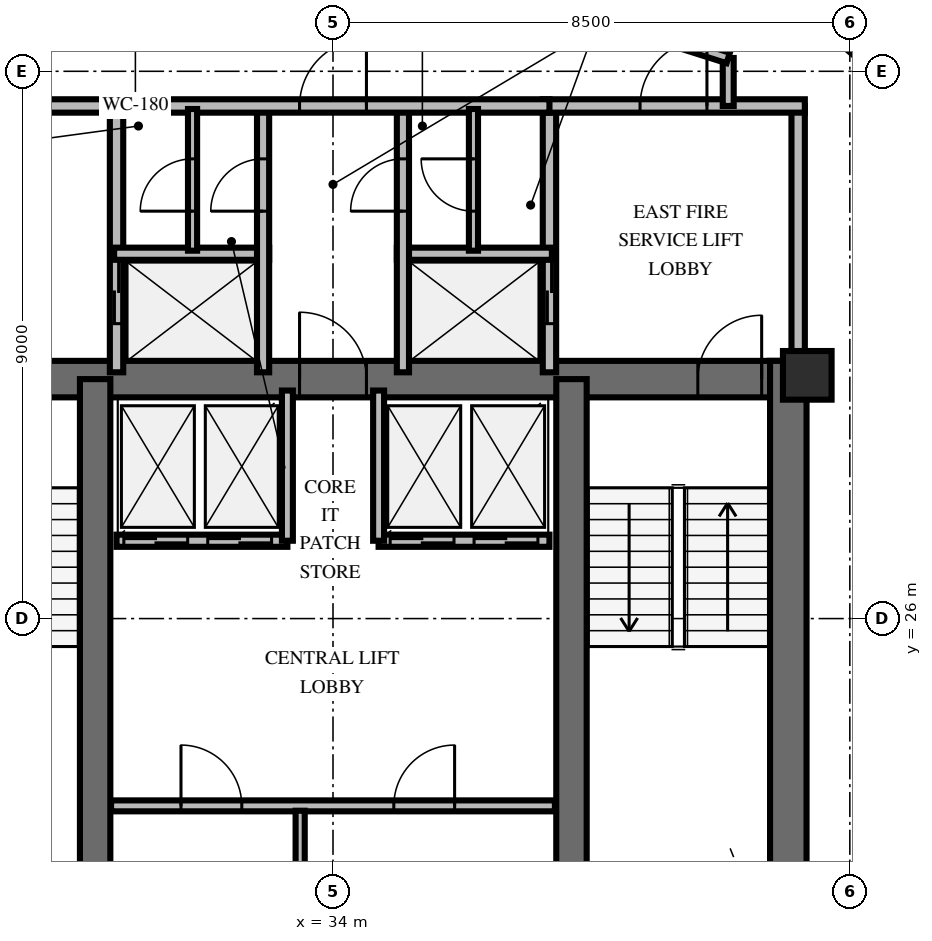
"""IFC4 building model, lengths in metres.
Left out: names, types, materials, properties, quantities, classifications, styles, units other than length and angle.
Written with IfcOpenShell. Run it as: python <this file> out.ifc"""

import sys

from ifc_helpers import new_model, si_unit, direction, frame, frame_2d, origin, origin_2d, place, context, subcontext, project, spatial, rectangle, extrude, element, fill, save


model = new_model("IFC4")
c1 = context("Model", 3, precision=1e-05, world=origin(), true_north=direction((0.0, 1.0)))
c2 = subcontext(c1, "Body", "Model", "MODEL_VIEW")
j1 = project(units=[si_unit("LENGTHUNIT", "METRE"), si_unit("PLANEANGLEUNIT", "RADIAN")], contexts=[c1])
p1 = place(None, origin())
s1 = spatial("IfcSite", under=j1, at=p1, CompositionType="ELEMENT")
p2 = place(p1, origin())
s2 = spatial("IfcBuilding", under=s1, at=p2, CompositionType="ELEMENT")
p3 = place(p2, frame((0.0, 0.0, 266.4)))
s3 = spatial("IfcBuildingStorey", under=s2, at=p3, CompositionType="ELEMENT", Elevation=266.4)
p4 = place(p3, frame((26.222, 29.938, 0.0), z_axis=(0.0, 0.0, 1.0), x_axis=(1.0, 0.0, 0.0)))
e1 = element("IfcWall", 1, at=p4, inside=s3, PredefinedType="SHEAR", context=c2, shape_type="SweptSolid", body=[
    extrude(rectangle(XDim=15.566, YDim=0.6, at=frame_2d((7.783, 0.0))), origin(), (0.0, 0.0, 1.0), 3.6),
])
p5 = place(p4, frame((0.728, 0.0, 0.0)))
e2 = element("IfcOpeningElement", 2, at=p5, cuts=e1, PredefinedType="OPENING", context=c2, shape_type="SweptSolid", body=[
    extrude(rectangle(XDim=1.05, YDim=2.15, at=frame_2d((0.525, 1.075))), frame((0.0, 0.31, 0.0), z_axis=(0.0, -1.0, 0.0), x_axis=(1.0, 0.0, 0.0)), (0.0, 0.0, 1.0), 0.62),
])
p6 = place(p4, frame((13.778, 0.0, 0.0)))
e3 = element("IfcOpeningElement", 3, at=p6, cuts=e1, PredefinedType="OPENING", context=c2, shape_type="SweptSolid", body=[
    extrude(rectangle(XDim=1.05, YDim=2.15, at=frame_2d((0.525, 1.075))), frame((0.0, 0.31, 0.0), z_axis=(0.0, -1.0, 0.0), x_axis=(1.0, 0.0, 0.0)), (0.0, 0.0, 1.0), 0.62),
])
p7 = place(p4, frame((7.228, 0.0, 0.0)))
e4 = element("IfcOpeningElement", 4, at=p7, cuts=e1, PredefinedType="OPENING", context=c2, shape_type="SweptSolid", body=[
    extrude(rectangle(XDim=1.1, YDim=2.15, at=frame_2d((0.55, 1.075))), frame((0.0, 0.31, 0.0), z_axis=(0.0, -1.0, 0.0), x_axis=(1.0, 0.0, 0.0)), (0.0, 0.0, 1.0), 0.62),
])
p8 = place(p3, frame((41.488, 19.962, 0.0), z_axis=(0.0, 0.0, 1.0), x_axis=(0.0, 1.0, 0.0)))
e5 = element("IfcWall", 5, at=p8, inside=s3, PredefinedType="SHEAR", context=c2, shape_type="SweptSolid", body=[
    extrude(rectangle(XDim=10.276, YDim=0.6, at=frame_2d((5.138, 0.0))), origin(), (0.0, 0.0, 1.0), 3.6),
])
for number, where, z_axis, x_axis in (
    (6, (30.088, 20.262, 0.0), (0.0, 0.0, 1.0), (0.0, 1.0, 0.0)),
    (7, (37.922, 20.262, 0.0), (0.0, 0.0, 1.0), (0.0, 1.0, 0.0)),
):
    element("IfcWall", number, at=place(p3, frame(where, z_axis=z_axis, x_axis=x_axis)), inside=s3, PredefinedType="SHEAR", context=c2, shape_type="SweptSolid", body=[
        extrude(rectangle(XDim=9.676, YDim=0.5, at=frame_2d((4.838, 0.0))), origin(), (0.0, 0.0, 1.0), 3.6),
    ])
p9 = place(p3, frame((41.8, 30.0, 0.0), z_axis=(0.0, 0.0, 1.0), x_axis=(1.0, 0.0, 0.0)))
e8 = element("IfcColumn", 8, at=p9, inside=s3, PredefinedType="PILASTER", context=c2, shape_type="SweptSolid", body=[
    extrude(rectangle(XDim=0.8, YDim=0.8, at=origin_2d()), origin(), (0.0, 0.0, 1.0), 3.6),
])
p10 = place(p3, frame((30.44, 30.05, 0.0), z_axis=(0.0, 0.0, 1.0), x_axis=(0.0, 1.0, 0.0)))
e9 = element("IfcWall", 9, at=p10, inside=s3, PredefinedType="SOLIDWALL", context=c2, shape_type="SweptSolid", body=[
    extrude(rectangle(XDim=4.38, YDim=0.22, at=frame_2d((2.19, 0.0))), origin(), (0.0, 0.0, 1.0), 2.46),
])
p11 = place(p10, frame((0.8, 0.0, 0.0)))
e10 = element("IfcOpeningElement", 10, at=p11, cuts=e9, PredefinedType="OPENING", context=c2, shape_type="SweptSolid", body=[
    extrude(rectangle(XDim=1.05, YDim=2.1, at=frame_2d((0.525, 1.05))), frame((0.0, 0.12, 0.0), z_axis=(0.0, -1.0, 0.0), x_axis=(1.0, 0.0, 0.0)), (0.0, 0.0, 1.0), 0.24),
])
p12 = place(p3, frame((26.24, 34.43, 0.0), z_axis=(0.0, 0.0, 1.0), x_axis=(1.0, 0.0, 0.0)))
e11 = element("IfcWall", 11, at=p12, inside=s3, PredefinedType="SOLIDWALL", context=c2, shape_type="SweptSolid", body=[
    extrude(rectangle(XDim=4.31, YDim=0.22, at=frame_2d((2.155, 0.0))), origin(), (0.0, 0.0, 1.0), 2.46),
])
p13 = place(p12, frame((1.6, 0.0, 0.0)))
e12 = element("IfcOpeningElement", 12, at=p13, cuts=e11, PredefinedType="OPENING", context=c2, shape_type="SweptSolid", body=[
    extrude(rectangle(XDim=1.1, YDim=2.15, at=frame_2d((0.55, 1.075))), frame((0.0, 0.12, 0.0), z_axis=(0.0, -1.0, 0.0), x_axis=(1.0, 0.0, 0.0)), (0.0, 0.0, 1.0), 0.24),
])
p14 = place(p3, frame((30.4, 32.0, 0.0), z_axis=(0.0, 0.0, 1.0), x_axis=(1.0, 0.0, 0.0)))
e13 = element("IfcWall", 13, at=p14, inside=s3, PredefinedType="SOLIDWALL", context=c2, shape_type="SweptSolid", body=[
    extrude(rectangle(XDim=2.55, YDim=0.2, at=frame_2d((1.275, 0.0))), origin(), (0.0, 0.0, 1.0), 2.46),
])
p15 = place(p3, frame((32.85, 30.05, 0.0), z_axis=(0.0, 0.0, 1.0), x_axis=(0.0, 1.0, 0.0)))
e14 = element("IfcWall", 14, at=p15, inside=s3, PredefinedType="SOLIDWALL", context=c2, shape_type="SweptSolid", body=[
    extrude(rectangle(XDim=4.38, YDim=0.2, at=frame_2d((2.19, 0.0))), origin(), (0.0, 0.0, 1.0), 2.46),
])
p16 = place(p15, frame((2.65, 0.0, 0.0)))
e15 = element("IfcOpeningElement", 15, at=p16, cuts=e14, PredefinedType="OPENING", context=c2, shape_type="SweptSolid", body=[
    extrude(rectangle(XDim=0.86, YDim=2.05, at=frame_2d((0.43, 1.025))), frame((0.0, 0.11, 0.0), z_axis=(0.0, -1.0, 0.0), x_axis=(1.0, 0.0, 0.0)), (0.0, 0.0, 1.0), 0.22),
])
p17 = place(p3, frame((37.56, 30.05, 0.0), z_axis=(0.0, 0.0, 1.0), x_axis=(0.0, 1.0, 0.0)))
e16 = element("IfcWall", 16, at=p17, inside=s3, PredefinedType="SOLIDWALL", context=c2, shape_type="SweptSolid", body=[
    extrude(rectangle(XDim=4.38, YDim=0.22, at=frame_2d((2.19, 0.0))), origin(), (0.0, 0.0, 1.0), 2.46),
])
p18 = place(p17, frame((0.8, 0.0, 0.0)))
e17 = element("IfcOpeningElement", 17, at=p18, cuts=e16, PredefinedType="OPENING", context=c2, shape_type="SweptSolid", body=[
    extrude(rectangle(XDim=1.05, YDim=2.1, at=frame_2d((0.525, 1.05))), frame((0.0, 0.12, 0.0), z_axis=(0.0, -1.0, 0.0), x_axis=(1.0, 0.0, 0.0)), (0.0, 0.0, 1.0), 0.24),
])
p19 = place(p3, frame((41.65, 30.05, 0.0), z_axis=(0.0, 0.0, 1.0), x_axis=(0.0, 1.0, 0.0)))
e18 = element("IfcWall", 18, at=p19, inside=s3, PredefinedType="SOLIDWALL", context=c2, shape_type="SweptSolid", body=[
    extrude(rectangle(XDim=4.38, YDim=0.22, at=frame_2d((2.19, 0.0))), origin(), (0.0, 0.0, 1.0), 2.46),
])
p20 = place(p3, frame((37.45, 34.43, 0.0), z_axis=(0.0, 0.0, 1.0), x_axis=(1.0, 0.0, 0.0)))
e19 = element("IfcWall", 19, at=p20, inside=s3, PredefinedType="SOLIDWALL", context=c2, shape_type="SweptSolid", body=[
    extrude(rectangle(XDim=4.31, YDim=0.22, at=frame_2d((2.155, 0.0))), origin(), (0.0, 0.0, 1.0), 2.46),
])
p21 = place(p20, frame((1.6, 0.0, 0.0)))
e20 = element("IfcOpeningElement", 20, at=p21, cuts=e19, PredefinedType="OPENING", context=c2, shape_type="SweptSolid", body=[
    extrude(rectangle(XDim=1.1, YDim=2.15, at=frame_2d((0.55, 1.075))), frame((0.0, 0.12, 0.0), z_axis=(0.0, -1.0, 0.0), x_axis=(1.0, 0.0, 0.0)), (0.0, 0.0, 1.0), 0.24),
])
p22 = place(p3, frame((35.05, 32.0, 0.0), z_axis=(0.0, 0.0, 1.0), x_axis=(1.0, 0.0, 0.0)))
e21 = element("IfcWall", 21, at=p22, inside=s3, PredefinedType="SOLIDWALL", context=c2, shape_type="SweptSolid", body=[
    extrude(rectangle(XDim=2.55, YDim=0.2, at=frame_2d((1.275, 0.0))), origin(), (0.0, 0.0, 1.0), 2.46),
])
p23 = place(p3, frame((35.15, 30.05, 0.0), z_axis=(0.0, 0.0, 1.0), x_axis=(0.0, 1.0, 0.0)))
e22 = element("IfcWall", 22, at=p23, inside=s3, PredefinedType="SOLIDWALL", context=c2, shape_type="SweptSolid", body=[
    extrude(rectangle(XDim=4.38, YDim=0.2, at=frame_2d((2.19, 0.0))), origin(), (0.0, 0.0, 1.0), 2.46),
])
p24 = place(p23, frame((2.65, 0.0, 0.0)))
e23 = element("IfcOpeningElement", 23, at=p24, cuts=e22, PredefinedType="OPENING", context=c2, shape_type="SweptSolid", body=[
    extrude(rectangle(XDim=0.86, YDim=2.05, at=frame_2d((0.43, 1.025))), frame((0.0, 0.11, 0.0), z_axis=(0.0, -1.0, 0.0), x_axis=(1.0, 0.0, 0.0)), (0.0, 0.0, 1.0), 0.22),
])
p25 = place(p3, frame((30.44, 34.43, 0.0), z_axis=(0.0, 0.0, 1.0), x_axis=(1.0, 0.0, 0.0)))
e24 = element("IfcWall", 24, at=p25, inside=s3, PredefinedType="SOLIDWALL", context=c2, shape_type="SweptSolid", body=[
    extrude(rectangle(XDim=7.12, YDim=0.22, at=frame_2d((3.56, 0.0))), origin(), (0.0, 0.0, 1.0), 2.46),
])
p26 = place(p25, frame((3.01, 0.0, 0.0)))
e25 = element("IfcOpeningElement", 25, at=p26, cuts=e24, PredefinedType="OPENING", context=c2, shape_type="SweptSolid", body=[
    extrude(rectangle(XDim=1.1, YDim=2.15, at=frame_2d((0.55, 1.075))), frame((0.0, 0.12, 0.0), z_axis=(0.0, -1.0, 0.0), x_axis=(1.0, 0.0, 0.0)), (0.0, 0.0, 1.0), 0.24),
])
p27 = place(p3, frame((31.69, 32.05, 0.0), z_axis=(0.0, 0.0, 1.0), x_axis=(0.0, 1.0, 0.0)))
e26 = element("IfcWall", 26, at=p27, inside=s3, PredefinedType="PARTITIONING", context=c2, shape_type="SweptSolid", body=[
    extrude(rectangle(XDim=2.33, YDim=0.15, at=frame_2d((1.165, 0.0))), origin(), (0.0, 0.0, 1.0), 2.46),
])
p28 = place(p27, frame((0.65, 0.0, 0.0)))
e27 = element("IfcOpeningElement", 27, at=p28, cuts=e26, PredefinedType="OPENING", context=c2, shape_type="SweptSolid", body=[
    extrude(rectangle(XDim=0.86, YDim=2.05, at=frame_2d((0.43, 1.025))), frame((0.0, 0.085, 0.0), z_axis=(0.0, -1.0, 0.0), x_axis=(1.0, 0.0, 0.0)), (0.0, 0.0, 1.0), 0.17),
])
p29 = place(p3, frame((36.31, 32.05, 0.0), z_axis=(0.0, 0.0, 1.0), x_axis=(0.0, 1.0, 0.0)))
e28 = element("IfcWall", 28, at=p29, inside=s3, PredefinedType="PARTITIONING", context=c2, shape_type="SweptSolid", body=[
    extrude(rectangle(XDim=2.33, YDim=0.15, at=frame_2d((1.165, 0.0))), origin(), (0.0, 0.0, 1.0), 2.46),
])
p30 = place(p29, frame((0.65, 0.0, 0.0)))
e29 = element("IfcOpeningElement", 29, at=p30, cuts=e28, PredefinedType="OPENING", context=c2, shape_type="SweptSolid", body=[
    extrude(rectangle(XDim=0.86, YDim=2.05, at=frame_2d((0.43, 1.025))), frame((0.0, 0.085, 0.0), z_axis=(0.0, -1.0, 0.0), x_axis=(1.0, 0.0, 0.0)), (0.0, 0.0, 1.0), 0.17),
])
p31 = place(p3, frame((30.35, 22.92, 0.0), z_axis=(0.0, 0.0, 1.0), x_axis=(1.0, 0.0, 0.0)))
e30 = element("IfcWall", 30, at=p31, inside=s3, PredefinedType="PARTITIONING", context=c2, shape_type="SweptSolid", body=[
    extrude(rectangle(XDim=7.3, YDim=0.18, at=frame_2d((3.65, 0.0))), origin(), (0.0, 0.0, 1.0), 2.46),
])
p32 = place(p31, frame((1.15, 0.0, 0.0)))
e31 = element("IfcOpeningElement", 31, at=p32, cuts=e30, PredefinedType="OPENING", context=c2, shape_type="SweptSolid", body=[
    extrude(rectangle(XDim=1.0, YDim=2.15, at=frame_2d((0.5, 1.075))), frame((0.0, 0.1, 0.0), z_axis=(0.0, -1.0, 0.0), x_axis=(1.0, 0.0, 0.0)), (0.0, 0.0, 1.0), 0.2),
])
p33 = place(p31, frame((4.65, 0.0, 0.0)))
e32 = element("IfcOpeningElement", 32, at=p33, cuts=e30, PredefinedType="OPENING", context=c2, shape_type="SweptSolid", body=[
    extrude(rectangle(XDim=1.0, YDim=2.15, at=frame_2d((0.5, 1.075))), frame((0.0, 0.1, 0.0), z_axis=(0.0, -1.0, 0.0), x_axis=(1.0, 0.0, 0.0)), (0.0, 0.0, 1.0), 0.2),
])
p34 = place(p3, frame((33.46, 20.5, 0.0), z_axis=(0.0, 0.0, 1.0), x_axis=(0.0, 1.0, 0.0)))
e33 = element("IfcWall", 33, at=p34, inside=s3, PredefinedType="PARTITIONING", context=c2, shape_type="SweptSolid", body=[
    extrude(rectangle(XDim=2.34, YDim=0.15, at=frame_2d((1.17, 0.0))), origin(), (0.0, 0.0, 1.0), 2.46),
])
p35 = place(p3, frame((30.44, 27.28, 0.0), z_axis=(0.0, 0.0, 1.0), x_axis=(1.0, 0.0, 0.0)))
e34 = element("IfcWall", 34, at=p35, inside=s3, PredefinedType="SOLIDWALL", context=c2, shape_type="SweptSolid", body=[
    extrude(rectangle(XDim=2.81, YDim=0.2, at=frame_2d((1.405, 0.0))), origin(), (0.0, 0.0, 1.0), 2.46),
])
p36 = place(p35, frame((0.12, 0.0, 0.0)))
e35 = element("IfcOpeningElement", 35, at=p36, cuts=e34, PredefinedType="OPENING", context=c2, shape_type="SweptSolid", body=[
    extrude(rectangle(XDim=1.05, YDim=2.1, at=frame_2d((0.525, 1.05))), frame((0.0, 0.11, 0.0), z_axis=(0.0, -1.0, 0.0), x_axis=(1.0, 0.0, 0.0)), (0.0, 0.0, 1.0), 0.22),
])
p37 = place(p35, frame((1.5, 0.0, 0.0)))
e36 = element("IfcOpeningElement", 36, at=p37, cuts=e34, PredefinedType="OPENING", context=c2, shape_type="SweptSolid", body=[
    extrude(rectangle(XDim=1.05, YDim=2.1, at=frame_2d((0.525, 1.05))), frame((0.0, 0.11, 0.0), z_axis=(0.0, -1.0, 0.0), x_axis=(1.0, 0.0, 0.0)), (0.0, 0.0, 1.0), 0.22),
])
p38 = place(p3, frame((33.25, 27.28, 0.0), z_axis=(0.0, 0.0, 1.0), x_axis=(0.0, 1.0, 0.0)))
e37 = element("IfcWall", 37, at=p38, inside=s3, PredefinedType="SOLIDWALL", context=c2, shape_type="SweptSolid", body=[
    extrude(rectangle(XDim=2.47, YDim=0.18, at=frame_2d((1.235, 0.0))), origin(), (0.0, 0.0, 1.0), 2.46),
])
p39 = place(p3, frame((34.75, 27.28, 0.0), z_axis=(0.0, 0.0, 1.0), x_axis=(1.0, 0.0, 0.0)))
e38 = element("IfcWall", 38, at=p39, inside=s3, PredefinedType="SOLIDWALL", context=c2, shape_type="SweptSolid", body=[
    extrude(rectangle(XDim=2.81, YDim=0.2, at=frame_2d((1.405, 0.0))), origin(), (0.0, 0.0, 1.0), 2.46),
])
p40 = place(p39, frame((0.19, 0.0, 0.0)))
e39 = element("IfcOpeningElement", 39, at=p40, cuts=e38, PredefinedType="OPENING", context=c2, shape_type="SweptSolid", body=[
    extrude(rectangle(XDim=1.05, YDim=2.1, at=frame_2d((0.525, 1.05))), frame((0.0, 0.11, 0.0), z_axis=(0.0, -1.0, 0.0), x_axis=(1.0, 0.0, 0.0)), (0.0, 0.0, 1.0), 0.22),
])
p41 = place(p39, frame((1.57, 0.0, 0.0)))
e40 = element("IfcOpeningElement", 40, at=p41, cuts=e38, PredefinedType="OPENING", context=c2, shape_type="SweptSolid", body=[
    extrude(rectangle(XDim=1.05, YDim=2.1, at=frame_2d((0.525, 1.05))), frame((0.0, 0.11, 0.0), z_axis=(0.0, -1.0, 0.0), x_axis=(1.0, 0.0, 0.0)), (0.0, 0.0, 1.0), 0.22),
])
p42 = place(p3, frame((34.75, 27.28, 0.0), z_axis=(0.0, 0.0, 1.0), x_axis=(0.0, 1.0, 0.0)))
e41 = element("IfcWall", 41, at=p42, inside=s3, PredefinedType="SOLIDWALL", context=c2, shape_type="SweptSolid", body=[
    extrude(rectangle(XDim=2.47, YDim=0.18, at=frame_2d((1.235, 0.0))), origin(), (0.0, 0.0, 1.0), 2.46),
])
p43 = place(p3, frame((40.5, 35.219, 0.0), z_axis=(0.0, 0.0, 1.0), x_axis=(0.0, -1.0, 0.0)))
e42 = element("IfcWall", 42, at=p43, inside=s3, PredefinedType="PARTITIONING", context=c2, shape_type="SweptSolid", body=[
    extrude(rectangle(XDim=0.789, YDim=0.18, at=frame_2d((0.395, 0.0))), origin(), (0.0, 0.0, 1.0), 2.46),
])
p44 = place(p3, frame((27.5, 35.219, 0.0), z_axis=(0.0, 0.0, 1.0), x_axis=(0.953228121756, 0.302251795518, 0.0)))
e43 = element("IfcWall", 43, at=p44, inside=s3, PredefinedType="PARTITIONING", context=c2, shape_type="SweptSolid", body=[
    extrude(rectangle(XDim=6.819, YDim=0.18, at=frame_2d((3.409, 0.0))), origin(), (0.0, 0.0, 1.0), 2.46),
])
p45 = place(p44, frame((2.86, 0.0, 0.0)))
e44 = element("IfcOpeningElement", 44, at=p45, cuts=e43, PredefinedType="OPENING", context=c2, shape_type="SweptSolid", body=[
    extrude(rectangle(XDim=1.1, YDim=2.15, at=frame_2d((0.55, 1.075))), frame((0.0, 0.1, 0.0), z_axis=(0.0, -1.0, 0.0), x_axis=(1.0, 0.0, 0.0)), (0.0, 0.0, 1.0), 0.2),
])
p46 = place(p3, frame((34.0, 37.28, 0.0), z_axis=(0.0, 0.0, 1.0), x_axis=(0.953228121756, -0.302251795518, 0.0)))
e45 = element("IfcWall", 45, at=p46, inside=s3, PredefinedType="PARTITIONING", context=c2, shape_type="SweptSolid", body=[
    extrude(rectangle(XDim=6.819, YDim=0.18, at=frame_2d((3.409, 0.0))), origin(), (0.0, 0.0, 1.0), 2.46),
])
p47 = place(p46, frame((2.86, 0.0, 0.0)))
e46 = element("IfcOpeningElement", 46, at=p47, cuts=e45, PredefinedType="OPENING", context=c2, shape_type="SweptSolid", body=[
    extrude(rectangle(XDim=1.1, YDim=2.15, at=frame_2d((0.55, 1.075))), frame((0.0, 0.1, 0.0), z_axis=(0.0, -1.0, 0.0), x_axis=(1.0, 0.0, 0.0)), (0.0, 0.0, 1.0), 0.2),
])
p48 = place(p3, frame((43.859, 34.273, 0.0), z_axis=(0.0, 0.0, 1.0), x_axis=(-0.760411517563, 0.649441547761, 0.0)))
e47 = element("IfcWall", 47, at=p48, inside=s3, PredefinedType="PARTITIONING", context=c2, shape_type="SweptSolid", body=[
    extrude(rectangle(XDim=4.248, YDim=0.18, at=frame_2d((2.124, 0.0))), origin(), (0.0, 0.0, 1.0), 2.46),
])
p49 = place(p6, origin())
e48 = element("IfcDoor", 48, at=p49, inside=s3, OperationType="SINGLE_SWING_RIGHT", PredefinedType="DOOR", context=c2, shape_type="SweptSolid", body=[
    extrude(rectangle(XDim=1.05, YDim=2.15, at=frame_2d((0.525, 1.075))), frame((0.0, 0.025, 0.0), z_axis=(0.0, -1.0, 0.0), x_axis=(1.0, 0.0, 0.0)), (0.0, 0.0, 1.0), 0.05),
])
fill(e3, e48)
p50 = place(p7, origin())
e49 = element("IfcDoor", 49, at=p50, inside=s3, OperationType="SINGLE_SWING_LEFT", PredefinedType="DOOR", context=c2, shape_type="SweptSolid", body=[
    extrude(rectangle(XDim=1.1, YDim=2.15, at=frame_2d((0.55, 1.075))), frame((0.0, 0.025, 0.0), z_axis=(0.0, -1.0, 0.0), x_axis=(1.0, 0.0, 0.0)), (0.0, 0.0, 1.0), 0.05),
])
fill(e4, e49)
p51 = place(p11, origin())
e50 = element("IfcDoor", 50, at=p51, inside=s3, OperationType="DOUBLE_DOOR_SLIDING", PredefinedType="USERDEFINED", context=c2, shape_type="SweptSolid", body=[
    extrude(rectangle(XDim=1.05, YDim=2.1, at=frame_2d((0.525, 1.05))), frame((0.0, 0.025, 0.0), z_axis=(0.0, -1.0, 0.0), x_axis=(1.0, 0.0, 0.0)), (0.0, 0.0, 1.0), 0.05),
])
fill(e10, e50)
p52 = place(p16, origin())
e51 = element("IfcDoor", 51, at=p52, inside=s3, OperationType="SINGLE_SWING_LEFT", PredefinedType="TRAPDOOR", context=c2, shape_type="SweptSolid", body=[
    extrude(rectangle(XDim=0.86, YDim=2.05, at=frame_2d((0.43, 1.025))), frame((0.0, 0.025, 0.0), z_axis=(0.0, -1.0, 0.0), x_axis=(1.0, 0.0, 0.0)), (0.0, 0.0, 1.0), 0.05),
])
fill(e15, e51)
p53 = place(p21, origin())
e52 = element("IfcDoor", 52, at=p53, inside=s3, OperationType="SINGLE_SWING_RIGHT", PredefinedType="DOOR", context=c2, shape_type="SweptSolid", body=[
    extrude(rectangle(XDim=1.1, YDim=2.15, at=frame_2d((0.55, 1.075))), frame((0.0, 0.025, 0.0), z_axis=(0.0, -1.0, 0.0), x_axis=(1.0, 0.0, 0.0)), (0.0, 0.0, 1.0), 0.05),
])
fill(e20, e52)
p54 = place(p18, origin())
e53 = element("IfcDoor", 53, at=p54, inside=s3, OperationType="DOUBLE_DOOR_SLIDING", PredefinedType="USERDEFINED", context=c2, shape_type="SweptSolid", body=[
    extrude(rectangle(XDim=1.05, YDim=2.1, at=frame_2d((0.525, 1.05))), frame((0.0, 0.025, 0.0), z_axis=(0.0, -1.0, 0.0), x_axis=(1.0, 0.0, 0.0)), (0.0, 0.0, 1.0), 0.05),
])
fill(e17, e53)
p55 = place(p24, origin())
e54 = element("IfcDoor", 54, at=p55, inside=s3, OperationType="SINGLE_SWING_LEFT", PredefinedType="TRAPDOOR", context=c2, shape_type="SweptSolid", body=[
    extrude(rectangle(XDim=0.86, YDim=2.05, at=frame_2d((0.43, 1.025))), frame((0.0, 0.025, 0.0), z_axis=(0.0, -1.0, 0.0), x_axis=(1.0, 0.0, 0.0)), (0.0, 0.0, 1.0), 0.05),
])
fill(e23, e54)
p56 = place(p26, origin())
e55 = element("IfcDoor", 55, at=p56, inside=s3, OperationType="SINGLE_SWING_RIGHT", PredefinedType="DOOR", context=c2, shape_type="SweptSolid", body=[
    extrude(rectangle(XDim=1.1, YDim=2.15, at=frame_2d((0.55, 1.075))), frame((0.0, 0.025, 0.0), z_axis=(0.0, -1.0, 0.0), x_axis=(1.0, 0.0, 0.0)), (0.0, 0.0, 1.0), 0.05),
])
fill(e25, e55)
p57 = place(p28, origin())
e56 = element("IfcDoor", 56, at=p57, inside=s3, OperationType="SINGLE_SWING_LEFT", PredefinedType="TRAPDOOR", context=c2, shape_type="SweptSolid", body=[
    extrude(rectangle(XDim=0.86, YDim=2.05, at=frame_2d((0.43, 1.025))), frame((0.0, 0.025, 0.0), z_axis=(0.0, -1.0, 0.0), x_axis=(1.0, 0.0, 0.0)), (0.0, 0.0, 1.0), 0.05),
])
fill(e27, e56)
p58 = place(p30, origin())
e57 = element("IfcDoor", 57, at=p58, inside=s3, OperationType="SINGLE_SWING_RIGHT", PredefinedType="TRAPDOOR", context=c2, shape_type="SweptSolid", body=[
    extrude(rectangle(XDim=0.86, YDim=2.05, at=frame_2d((0.43, 1.025))), frame((0.0, 0.025, 0.0), z_axis=(0.0, -1.0, 0.0), x_axis=(1.0, 0.0, 0.0)), (0.0, 0.0, 1.0), 0.05),
])
fill(e29, e57)
p59 = place(p32, origin())
e58 = element("IfcDoor", 58, at=p59, inside=s3, OperationType="SINGLE_SWING_LEFT", PredefinedType="DOOR", context=c2, shape_type="SweptSolid", body=[
    extrude(rectangle(XDim=1.0, YDim=2.15, at=frame_2d((0.5, 1.075))), frame((0.0, 0.025, 0.0), z_axis=(0.0, -1.0, 0.0), x_axis=(1.0, 0.0, 0.0)), (0.0, 0.0, 1.0), 0.05),
])
fill(e31, e58)
p60 = place(p33, origin())
e59 = element("IfcDoor", 59, at=p60, inside=s3, OperationType="SINGLE_SWING_RIGHT", PredefinedType="DOOR", context=c2, shape_type="SweptSolid", body=[
    extrude(rectangle(XDim=1.0, YDim=2.15, at=frame_2d((0.5, 1.075))), frame((0.0, 0.025, 0.0), z_axis=(0.0, -1.0, 0.0), x_axis=(1.0, 0.0, 0.0)), (0.0, 0.0, 1.0), 0.05),
])
fill(e32, e59)
p61 = place(p36, origin())
e60 = element("IfcDoor", 60, at=p61, inside=s3, OperationType="DOUBLE_DOOR_SLIDING", PredefinedType="USERDEFINED", context=c2, shape_type="SweptSolid", body=[
    extrude(rectangle(XDim=1.05, YDim=2.1, at=frame_2d((0.525, 1.05))), frame((0.0, 0.025, 0.0), z_axis=(0.0, -1.0, 0.0), x_axis=(1.0, 0.0, 0.0)), (0.0, 0.0, 1.0), 0.05),
])
fill(e35, e60)
p62 = place(p37, origin())
e61 = element("IfcDoor", 61, at=p62, inside=s3, OperationType="DOUBLE_DOOR_SLIDING", PredefinedType="USERDEFINED", context=c2, shape_type="SweptSolid", body=[
    extrude(rectangle(XDim=1.05, YDim=2.1, at=frame_2d((0.525, 1.05))), frame((0.0, 0.025, 0.0), z_axis=(0.0, -1.0, 0.0), x_axis=(1.0, 0.0, 0.0)), (0.0, 0.0, 1.0), 0.05),
])
fill(e36, e61)
p63 = place(p40, origin())
e62 = element("IfcDoor", 62, at=p63, inside=s3, OperationType="DOUBLE_DOOR_SLIDING", PredefinedType="USERDEFINED", context=c2, shape_type="SweptSolid", body=[
    extrude(rectangle(XDim=1.05, YDim=2.1, at=frame_2d((0.525, 1.05))), frame((0.0, 0.025, 0.0), z_axis=(0.0, -1.0, 0.0), x_axis=(1.0, 0.0, 0.0)), (0.0, 0.0, 1.0), 0.05),
])
fill(e39, e62)
p64 = place(p41, origin())
e63 = element("IfcDoor", 63, at=p64, inside=s3, OperationType="DOUBLE_DOOR_SLIDING", PredefinedType="USERDEFINED", context=c2, shape_type="SweptSolid", body=[
    extrude(rectangle(XDim=1.05, YDim=2.1, at=frame_2d((0.525, 1.05))), frame((0.0, 0.025, 0.0), z_axis=(0.0, -1.0, 0.0), x_axis=(1.0, 0.0, 0.0)), (0.0, 0.0, 1.0), 0.05),
])
fill(e40, e63)
save(model, sys.argv[1])
